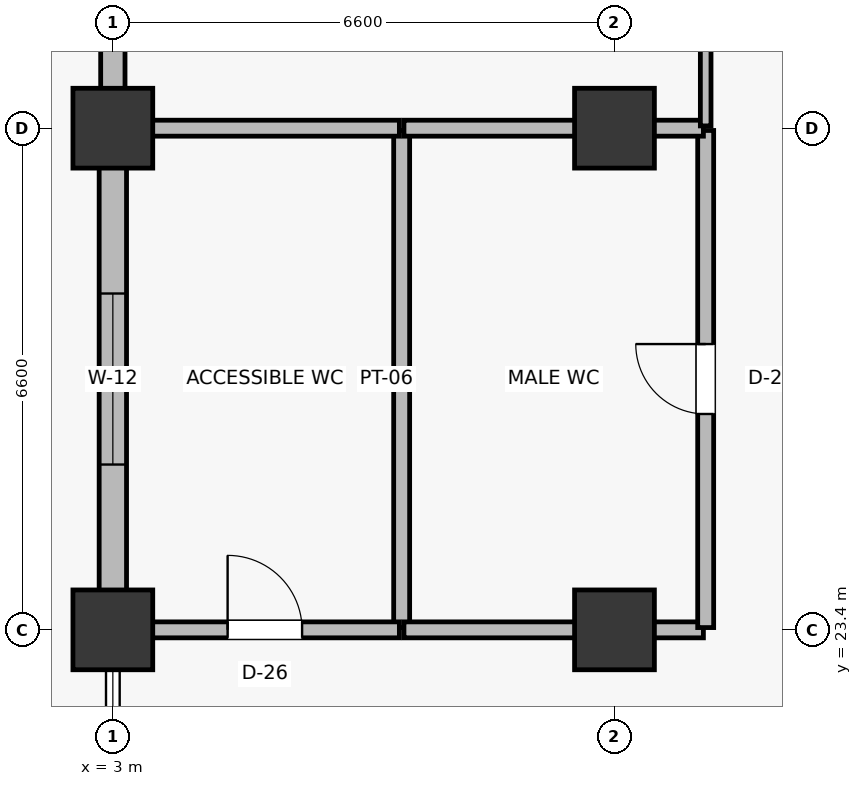
"""IFC4 building model, lengths in metres.
Left out: names, types, materials, properties, quantities, classifications, styles, units other than length and angle.
Written with IfcOpenShell. Run it as: python <this file> out.ifc"""

import sys

from ifc_helpers import new_model, si_unit, direction, frame, frame_2d, origin, origin_2d, place, context, subcontext, project, spatial, rectangle, extrude, element, fill, save


model = new_model("IFC4")
c1 = context("Model", 3, precision=1e-05, world=origin(), true_north=direction((0.0, 1.0)))
c2 = subcontext(c1, "Body", "Model", "MODEL_VIEW")
j1 = project(units=[si_unit("LENGTHUNIT", "METRE"), si_unit("PLANEANGLEUNIT", "RADIAN")], contexts=[c1])
p1 = place(None, origin())
s1 = spatial("IfcSite", under=j1, at=p1, CompositionType="ELEMENT")
p2 = place(p1, origin())
s2 = spatial("IfcBuilding", under=s1, at=p2, CompositionType="ELEMENT")
p3 = place(p2, origin())
s3 = spatial("IfcBuildingStorey", under=s2, at=p3, CompositionType="ELEMENT", Elevation=0.0)
for number, where, z_axis, x_axis in (
    (1, (3.0, 23.4, 0.0), (0.0, 0.0, 1.0), (1.0, 0.0, 0.0)),
    (2, (3.0, 30.0, 0.0), (0.0, 0.0, 1.0), (1.0, 0.0, 0.0)),
    (3, (9.6, 23.4, 0.0), (0.0, 0.0, 1.0), (1.0, 0.0, 0.0)),
    (4, (9.6, 30.0, 0.0), (0.0, 0.0, 1.0), (1.0, 0.0, 0.0)),
):
    element("IfcColumn", number, at=place(p3, frame(where, z_axis=z_axis, x_axis=x_axis)), inside=s3, PredefinedType="COLUMN", context=c2, shape_type="SweptSolid", body=[
        extrude(rectangle(XDim=1.05, YDim=1.05, at=origin_2d()), origin(), (0.0, 0.0, 1.0), 5.4),
    ])
p4 = place(p3, frame((3.0, 23.905, 0.0), z_axis=(0.0, 0.0, 1.0), x_axis=(0.0, 1.0, 0.0)))
e5 = element("IfcWall", 5, at=p4, inside=s3, PredefinedType="SOLIDWALL", context=c2, shape_type="SweptSolid", body=[
    extrude(rectangle(XDim=5.59, YDim=0.36, at=frame_2d((2.795, 0.0))), origin(), (0.0, 0.0, 1.0), 4.475),
])
p5 = place(p4, frame((1.67, 0.0, 0.9)))
e6 = element("IfcOpeningElement", 6, at=p5, cuts=e5, PredefinedType="OPENING", context=c2, shape_type="SweptSolid", body=[
    extrude(rectangle(XDim=2.25, YDim=1.85, at=frame_2d((1.125, 0.925))), frame((0.0, 0.19, 0.0), z_axis=(0.0, -1.0, 0.0), x_axis=(1.0, 0.0, 0.0)), (0.0, 0.0, 1.0), 0.38),
])
p6 = place(p3, frame((3.0, 30.505, 0.0), z_axis=(0.0, 0.0, 1.0), x_axis=(0.0, 1.0, 0.0)))
e7 = element("IfcWall", 7, at=p6, inside=s3, PredefinedType="SOLIDWALL", context=c2, shape_type="SweptSolid", body=[
    extrude(rectangle(XDim=8.06, YDim=0.32, at=frame_2d((4.03, 0.0))), origin(), (0.0, 0.0, 1.0), 4.375),
])
p7 = place(p6, frame((3.58, 0.0, 0.9)))
e8 = element("IfcOpeningElement", 8, at=p7, cuts=e7, PredefinedType="OPENING", context=c2, shape_type="SweptSolid", body=[
    extrude(rectangle(XDim=0.9, YDim=1.8, at=frame_2d((0.45, 0.9))), frame((0.0, 0.17, 0.0), z_axis=(0.0, -1.0, 0.0), x_axis=(1.0, 0.0, 0.0)), (0.0, 0.0, 1.0), 0.34),
])
p8 = place(p3, frame((6.8, 23.43, 0.0), z_axis=(0.0, 0.0, 1.0), x_axis=(0.0, 1.0, 0.0)))
e9 = element("IfcWall", 9, at=p8, inside=s3, PredefinedType="PLUMBINGWALL", context=c2, shape_type="SweptSolid", body=[
    extrude(rectangle(XDim=6.54, YDim=0.21, at=frame_2d((3.27, 0.0))), origin(), (0.0, 0.0, 1.0), 4.325),
])
p9 = place(p3, frame((3.23, 23.4, 0.0), z_axis=(0.0, 0.0, 1.0), x_axis=(1.0, 0.0, 0.0)))
e10 = element("IfcWall", 10, at=p9, inside=s3, PredefinedType="PLUMBINGWALL", context=c2, shape_type="SweptSolid", body=[
    extrude(rectangle(XDim=3.54, YDim=0.21, at=frame_2d((1.77, 0.0))), origin(), (0.0, 0.0, 1.0), 4.595),
])
p10 = place(p9, frame((1.28, 0.0, 0.0)))
e11 = element("IfcOpeningElement", 11, at=p10, cuts=e10, PredefinedType="OPENING", context=c2, shape_type="SweptSolid", body=[
    extrude(rectangle(XDim=0.98, YDim=2.1, at=frame_2d((0.49, 1.05))), frame((0.0, 0.115, 0.0), z_axis=(0.0, -1.0, 0.0), x_axis=(1.0, 0.0, 0.0)), (0.0, 0.0, 1.0), 0.23),
])
p11 = place(p3, frame((3.23, 30.0, 0.0), z_axis=(0.0, 0.0, 1.0), x_axis=(1.0, 0.0, 0.0)))
e12 = element("IfcWall", 12, at=p11, inside=s3, PredefinedType="PLUMBINGWALL", context=c2, shape_type="SweptSolid", body=[
    extrude(rectangle(XDim=3.54, YDim=0.21, at=frame_2d((1.77, 0.0))), origin(), (0.0, 0.0, 1.0), 4.325),
])
p12 = place(p3, frame((6.83, 23.4, 0.0), z_axis=(0.0, 0.0, 1.0), x_axis=(1.0, 0.0, 0.0)))
e13 = element("IfcWall", 13, at=p12, inside=s3, PredefinedType="PLUMBINGWALL", context=c2, shape_type="SweptSolid", body=[
    extrude(rectangle(XDim=3.94, YDim=0.21, at=frame_2d((1.97, 0.0))), origin(), (0.0, 0.0, 1.0), 4.425),
])
p13 = place(p3, frame((10.8, 23.43, 0.0), z_axis=(0.0, 0.0, 1.0), x_axis=(0.0, 1.0, 0.0)))
e14 = element("IfcWall", 14, at=p13, inside=s3, PredefinedType="PLUMBINGWALL", context=c2, shape_type="SweptSolid", body=[
    extrude(rectangle(XDim=6.54, YDim=0.21, at=frame_2d((3.27, 0.0))), origin(), (0.0, 0.0, 1.0), 4.215),
])
p14 = place(p13, frame((2.81, 0.0, 0.0)))
e15 = element("IfcOpeningElement", 15, at=p14, cuts=e14, PredefinedType="OPENING", context=c2, shape_type="SweptSolid", body=[
    extrude(rectangle(XDim=0.92, YDim=2.1, at=frame_2d((0.46, 1.05))), frame((0.0, 0.115, 0.0), z_axis=(0.0, -1.0, 0.0), x_axis=(1.0, 0.0, 0.0)), (0.0, 0.0, 1.0), 0.23),
])
p15 = place(p3, frame((6.83, 30.0, 0.0), z_axis=(0.0, 0.0, 1.0), x_axis=(1.0, 0.0, 0.0)))
e16 = element("IfcWall", 16, at=p15, inside=s3, PredefinedType="PLUMBINGWALL", context=c2, shape_type="SweptSolid", body=[
    extrude(rectangle(XDim=3.94, YDim=0.21, at=frame_2d((1.97, 0.0))), origin(), (0.0, 0.0, 1.0), 4.215),
])
p16 = place(p3, frame((10.8, 30.03, 0.0), z_axis=(0.0, 0.0, 1.0), x_axis=(0.0, 1.0, 0.0)))
e17 = element("IfcWall", 17, at=p16, inside=s3, PredefinedType="PARTITIONING", context=c2, shape_type="SweptSolid", body=[
    extrude(rectangle(XDim=25.44, YDim=0.14, at=frame_2d((12.72, 0.0))), origin(), (0.0, 0.0, 1.0), 4.115),
])
p17 = place(p16, frame((12.18, 0.0, 0.0)))
e18 = element("IfcOpeningElement", 18, at=p17, cuts=e17, PredefinedType="OPENING", context=c2, shape_type="SweptSolid", body=[
    extrude(rectangle(XDim=1.08, YDim=2.15, at=frame_2d((0.54, 1.075))), frame((0.0, 0.08, 0.0), z_axis=(0.0, -1.0, 0.0), x_axis=(1.0, 0.0, 0.0)), (0.0, 0.0, 1.0), 0.16),
])
p18 = place(p5, origin())
e19 = element("IfcWindow", 19, at=p18, inside=s3, PartitioningType="DOUBLE_PANEL_VERTICAL", PredefinedType="WINDOW", context=c2, shape_type="SweptSolid", body=[
    extrude(rectangle(XDim=2.25, YDim=1.85, at=frame_2d((1.125, 0.925))), frame((0.0, 0.03, 0.0), z_axis=(0.0, -1.0, 0.0), x_axis=(1.0, 0.0, 0.0)), (0.0, 0.0, 1.0), 0.06),
])
fill(e6, e19)
p19 = place(p10, origin())
e20 = element("IfcDoor", 20, at=p19, inside=s3, OperationType="SINGLE_SWING_LEFT", PredefinedType="DOOR", context=c2, shape_type="SweptSolid", body=[
    extrude(rectangle(XDim=0.98, YDim=2.1, at=frame_2d((0.49, 1.05))), frame((0.0, 0.025, 0.0), z_axis=(0.0, -1.0, 0.0), x_axis=(1.0, 0.0, 0.0)), (0.0, 0.0, 1.0), 0.05),
])
fill(e11, e20)
p20 = place(p14, origin())
e21 = element("IfcDoor", 21, at=p20, inside=s3, OperationType="SINGLE_SWING_RIGHT", PredefinedType="DOOR", context=c2, shape_type="SweptSolid", body=[
    extrude(rectangle(XDim=0.92, YDim=2.1, at=frame_2d((0.46, 1.05))), frame((0.0, 0.025, 0.0), z_axis=(0.0, -1.0, 0.0), x_axis=(1.0, 0.0, 0.0)), (0.0, 0.0, 1.0), 0.05),
])
fill(e15, e21)
save(model, sys.argv[1])
